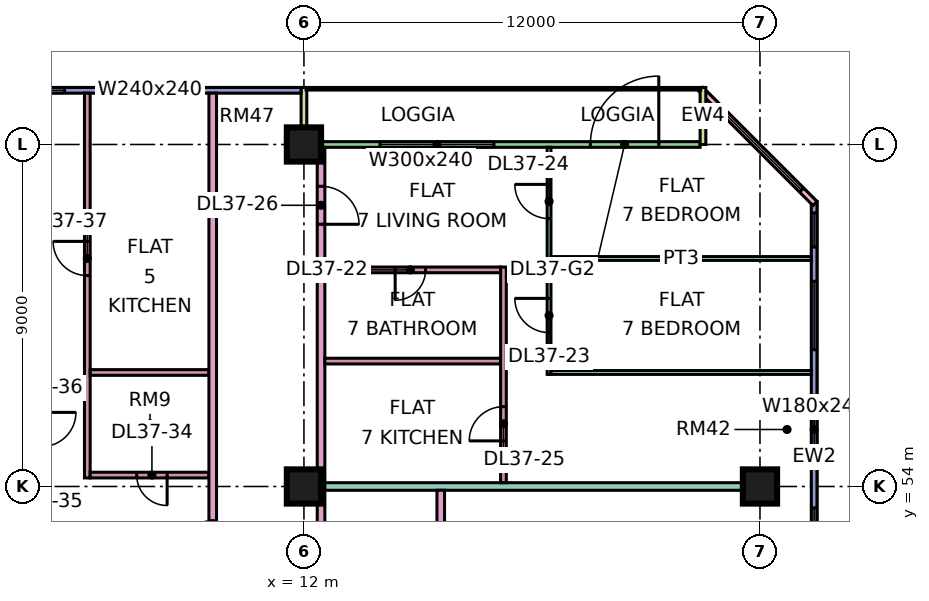
"""IFC4 building model, lengths in metres.
Left out: names, types, materials, properties, quantities, classifications, styles, units other than length and angle.
Written with IfcOpenShell. Run it as: python <this file> out.ifc"""

import sys

from ifc_helpers import new_model, si_unit, direction, frame, frame_2d, origin, origin_2d, place, context, subcontext, project, spatial, rectangle, extrude, element, fill, save


model = new_model("IFC4")
c1 = context("Model", 3, precision=1e-05, world=origin(), true_north=direction((0.0, 1.0)))
c2 = subcontext(c1, "Body", "Model", "MODEL_VIEW")
j1 = project(units=[si_unit("LENGTHUNIT", "METRE"), si_unit("PLANEANGLEUNIT", "RADIAN")], contexts=[c1])
p1 = place(None, origin())
s1 = spatial("IfcSite", under=j1, at=p1, CompositionType="ELEMENT")
p2 = place(p1, origin())
s2 = spatial("IfcBuilding", under=s1, at=p2, CompositionType="ELEMENT")
p3 = place(p2, frame((0.0, 0.0, 164.9)))
s3 = spatial("IfcBuildingStorey", under=s2, at=p3, CompositionType="ELEMENT", Elevation=164.9)
for number, where, z_axis, x_axis in (
    (1, (12.0, 54.0, 0.0), (0.0, 0.0, 1.0), (1.0, 0.0, 0.0)),
    (2, (12.0, 63.0, 0.0), (0.0, 0.0, 1.0), (1.0, 0.0, 0.0)),
    (3, (24.0, 54.0, 0.0), (0.0, 0.0, 1.0), (1.0, 0.0, 0.0)),
):
    element("IfcColumn", number, at=place(p3, frame(where, z_axis=z_axis, x_axis=x_axis)), inside=s3, PredefinedType="COLUMN", context=c2, shape_type="SweptSolid", body=[
        extrude(rectangle(XDim=0.9, YDim=0.9, at=origin_2d()), origin(), (0.0, 0.0, 1.0), 3.75),
    ])
p4 = place(p3, frame((25.425, 48.075, 0.0), z_axis=(0.0, 0.0, 1.0), x_axis=(0.0, 1.0, 0.0)))
e4 = element("IfcWall", 4, at=p4, inside=s3, PredefinedType="SOLIDWALL", context=c2, shape_type="SweptSolid", body=[
    extrude(rectangle(XDim=13.425, YDim=0.15, at=frame_2d((6.712, 0.0))), origin(), (0.0, 0.0, 1.0), 3.35),
])
p5 = place(p4, frame((0.562, 0.0, 0.45)))
e5 = element("IfcOpeningElement", 5, at=p5, cuts=e4, PredefinedType="OPENING", context=c2, shape_type="SweptSolid", body=[
    extrude(rectangle(XDim=4.8, YDim=2.4, at=frame_2d((2.4, 1.2))), frame((0.0, 0.085, 0.0), z_axis=(0.0, -1.0, 0.0), x_axis=(1.0, 0.0, 0.0)), (0.0, 0.0, 1.0), 0.17),
])
p6 = place(p4, frame((6.525, 0.0, 0.45)))
e6 = element("IfcOpeningElement", 6, at=p6, cuts=e4, PredefinedType="OPENING", context=c2, shape_type="SweptSolid", body=[
    extrude(rectangle(XDim=1.8, YDim=2.4, at=frame_2d((0.9, 1.2))), frame((0.0, 0.085, 0.0), z_axis=(0.0, -1.0, 0.0), x_axis=(1.0, 0.0, 0.0)), (0.0, 0.0, 1.0), 0.17),
])
p7 = place(p4, frame((9.525, 0.0, 0.45)))
e7 = element("IfcOpeningElement", 7, at=p7, cuts=e4, PredefinedType="OPENING", context=c2, shape_type="SweptSolid", body=[
    extrude(rectangle(XDim=1.8, YDim=2.4, at=frame_2d((0.9, 1.2))), frame((0.0, 0.085, 0.0), z_axis=(0.0, -1.0, 0.0), x_axis=(1.0, 0.0, 0.0)), (0.0, 0.0, 1.0), 0.17),
])
p8 = place(p4, frame((12.225, 0.0, 0.45)))
e8 = element("IfcOpeningElement", 8, at=p8, cuts=e4, PredefinedType="OPENING", context=c2, shape_type="SweptSolid", body=[
    extrude(rectangle(XDim=0.9, YDim=2.4, at=frame_2d((0.45, 1.2))), frame((0.0, 0.085, 0.0), z_axis=(0.0, -1.0, 0.0), x_axis=(1.0, 0.0, 0.0)), (0.0, 0.0, 1.0), 0.17),
])
p9 = place(p3, frame((25.447, 61.447, 0.0), z_axis=(0.0, 0.0, 1.0), x_axis=(-0.707106781187, 0.707106781187, 0.0)))
e9 = element("IfcWall", 9, at=p9, inside=s3, PredefinedType="SOLIDWALL", context=c2, shape_type="SweptSolid", body=[
    extrude(rectangle(XDim=4.243, YDim=0.15, at=frame_2d((2.121, 0.0))), origin(), (0.0, 0.0, 1.0), 3.35),
])
p10 = place(p9, frame((0.498, 0.0, 0.45)))
e10 = element("IfcOpeningElement", 10, at=p10, cuts=e9, PredefinedType="OPENING", context=c2, shape_type="SweptSolid", body=[
    extrude(rectangle(XDim=3.0, YDim=2.4, at=frame_2d((1.5, 1.2))), frame((0.0, 0.085, 0.0), z_axis=(0.0, -1.0, 0.0), x_axis=(1.0, 0.0, 0.0)), (0.0, 0.0, 1.0), 0.17),
])
p11 = place(p3, frame((22.425, 63.0, 0.0), z_axis=(0.0, 0.0, 1.0), x_axis=(-1.0, 0.0, 0.0)))
e11 = element("IfcWall", 11, at=p11, inside=s3, PredefinedType="SOLIDWALL", context=c2, shape_type="SweptSolid", body=[
    extrude(rectangle(XDim=10.35, YDim=0.15, at=frame_2d((5.175, 0.0))), origin(), (0.0, 0.0, 1.0), 3.35),
])
p12 = place(p11, frame((1.087, 0.0, 0.0)))
e12 = element("IfcOpeningElement", 12, at=p12, cuts=e11, PredefinedType="OPENING", context=c2, shape_type="SweptSolid", body=[
    extrude(rectangle(XDim=1.8, YDim=2.4, at=frame_2d((0.9, 1.2))), frame((0.0, 0.085, 0.0), z_axis=(0.0, -1.0, 0.0), x_axis=(1.0, 0.0, 0.0)), (0.0, 0.0, 1.0), 0.17),
])
p13 = place(p11, frame((5.425, 0.0, 0.45)))
e13 = element("IfcOpeningElement", 13, at=p13, cuts=e11, PredefinedType="OPENING", context=c2, shape_type="SweptSolid", body=[
    extrude(rectangle(XDim=3.0, YDim=2.4, at=frame_2d((1.5, 1.2))), frame((0.0, 0.085, 0.0), z_axis=(0.0, -1.0, 0.0), x_axis=(1.0, 0.0, 0.0)), (0.0, 0.0, 1.0), 0.17),
])
for number, where, z_axis, x_axis in (
    (14, (22.5, 64.5, 0.0), (0.0, 0.0, 1.0), (0.0, -1.0, 0.0)),
    (15, (12.0, 64.5, 0.0), (0.0, 0.0, 1.0), (0.0, -1.0, 0.0)),
):
    element("IfcWall", number, at=place(p3, frame(where, z_axis=z_axis, x_axis=x_axis)), inside=s3, PredefinedType="SOLIDWALL", context=c2, shape_type="SweptSolid", body=[
        extrude(rectangle(XDim=1.5, YDim=0.15, at=frame_2d((0.75, 0.0))), origin(), (0.0, 0.0, 1.0), 3.35),
    ])
p14 = place(p3, frame((11.925, 64.425, 0.0), z_axis=(0.0, 0.0, 1.0), x_axis=(-1.0, 0.0, 0.0)))
e16 = element("IfcWall", 16, at=p14, inside=s3, PredefinedType="SOLIDWALL", context=c2, shape_type="SweptSolid", body=[
    extrude(rectangle(XDim=10.425, YDim=0.15, at=frame_2d((5.212, 0.0))), origin(), (0.0, 0.0, 1.0), 3.35),
])
p15 = place(p14, frame((2.775, 0.0, 0.45)))
e17 = element("IfcOpeningElement", 17, at=p15, cuts=e16, PredefinedType="OPENING", context=c2, shape_type="SweptSolid", body=[
    extrude(rectangle(XDim=2.4, YDim=2.4, at=frame_2d((1.2, 1.2))), frame((0.0, 0.085, 0.0), z_axis=(0.0, -1.0, 0.0), x_axis=(1.0, 0.0, 0.0)), (0.0, 0.0, 1.0), 0.17),
])
p16 = place(p14, frame((6.225, 0.0, 0.45)))
e18 = element("IfcOpeningElement", 18, at=p16, cuts=e16, PredefinedType="OPENING", context=c2, shape_type="SweptSolid", body=[
    extrude(rectangle(XDim=3.6, YDim=2.4, at=frame_2d((1.8, 1.2))), frame((0.0, 0.085, 0.0), z_axis=(0.0, -1.0, 0.0), x_axis=(1.0, 0.0, 0.0)), (0.0, 0.0, 1.0), 0.17),
])
p17 = place(p3, frame((6.3, 54.225, 0.0), z_axis=(0.0, 0.0, 1.0), x_axis=(0.0, 1.0, 0.0)))
e19 = element("IfcWall", 19, at=p17, inside=s3, PredefinedType="PARTITIONING", context=c2, shape_type="SweptSolid", body=[
    extrude(rectangle(XDim=10.125, YDim=0.15, at=frame_2d((5.062, 0.0))), origin(), (0.0, 0.0, 1.0), 3.35),
])
p18 = place(p17, frame((5.325, 0.0, 0.0)))
e20 = element("IfcOpeningElement", 20, at=p18, cuts=e19, PredefinedType="OPENING", context=c2, shape_type="SweptSolid", body=[
    extrude(rectangle(XDim=0.9, YDim=2.1, at=frame_2d((0.45, 1.05))), frame((0.0, 0.085, 0.0), z_axis=(0.0, -1.0, 0.0), x_axis=(1.0, 0.0, 0.0)), (0.0, 0.0, 1.0), 0.17),
])
p19 = place(p3, frame((6.375, 54.3, 0.0), z_axis=(0.0, 0.0, 1.0), x_axis=(1.0, 0.0, 0.0)))
e21 = element("IfcWall", 21, at=p19, inside=s3, PredefinedType="PARTITIONING", context=c2, shape_type="SweptSolid", body=[
    extrude(rectangle(XDim=3.125, YDim=0.15, at=frame_2d((1.562, 0.0))), origin(), (0.0, 0.0, 1.0), 3.35),
])
p20 = place(p19, frame((1.225, 0.0, 0.0)))
e22 = element("IfcOpeningElement", 22, at=p20, cuts=e21, PredefinedType="OPENING", context=c2, shape_type="SweptSolid", body=[
    extrude(rectangle(XDim=0.8, YDim=2.1, at=frame_2d((0.4, 1.05))), frame((0.0, 0.085, 0.0), z_axis=(0.0, -1.0, 0.0), x_axis=(1.0, 0.0, 0.0)), (0.0, 0.0, 1.0), 0.17),
])
p21 = place(p3, frame((6.375, 57.0, 0.0), z_axis=(0.0, 0.0, 1.0), x_axis=(1.0, 0.0, 0.0)))
e23 = element("IfcWall", 23, at=p21, inside=s3, PredefinedType="PARTITIONING", context=c2, shape_type="SweptSolid", body=[
    extrude(rectangle(XDim=3.125, YDim=0.15, at=frame_2d((1.562, 0.0))), origin(), (0.0, 0.0, 1.0), 3.35),
])
p22 = place(p3, frame((9.6, 20.0, 0.0), z_axis=(0.0, 0.0, 1.0), x_axis=(0.0, 1.0, 0.0)))
e24 = element("IfcWall", 24, at=p22, inside=s3, PredefinedType="PARTITIONING", context=c2, shape_type="SweptSolid", body=[
    extrude(rectangle(XDim=44.35, YDim=0.2, at=frame_2d((22.175, 0.0))), origin(), (0.0, 0.0, 1.0), 3.35),
])
p23 = place(p22, frame((28.8, 0.0, 0.0)))
e25 = element("IfcOpeningElement", 25, at=p23, cuts=e24, PredefinedType="OPENING", context=c2, shape_type="SweptSolid", body=[
    extrude(rectangle(XDim=1.0, YDim=2.1, at=frame_2d((0.5, 1.05))), frame((0.0, 0.11, 0.0), z_axis=(0.0, -1.0, 0.0), x_axis=(1.0, 0.0, 0.0)), (0.0, 0.0, 1.0), 0.22),
])
p24 = place(p22, frame((32.1, 0.0, 0.0)))
e26 = element("IfcOpeningElement", 26, at=p24, cuts=e24, PredefinedType="OPENING", context=c2, shape_type="SweptSolid", body=[
    extrude(rectangle(XDim=1.0, YDim=2.1, at=frame_2d((0.5, 1.05))), frame((0.0, 0.11, 0.0), z_axis=(0.0, -1.0, 0.0), x_axis=(1.0, 0.0, 0.0)), (0.0, 0.0, 1.0), 0.22),
])
p25 = place(p22, frame((0.6, 0.0, 0.0)))
e27 = element("IfcOpeningElement", 27, at=p25, cuts=e24, PredefinedType="OPENING", context=c2, shape_type="SweptSolid", body=[
    extrude(rectangle(XDim=1.2, YDim=2.1, at=frame_2d((0.6, 1.05))), frame((0.0, 0.11, 0.0), z_axis=(0.0, -1.0, 0.0), x_axis=(1.0, 0.0, 0.0)), (0.0, 0.0, 1.0), 0.22),
])
p26 = place(p22, frame((14.25, 0.0, 0.0)))
e28 = element("IfcOpeningElement", 28, at=p26, cuts=e24, PredefinedType="OPENING", context=c2, shape_type="SweptSolid", body=[
    extrude(rectangle(XDim=1.0, YDim=2.1, at=frame_2d((0.5, 1.05))), frame((0.0, 0.11, 0.0), z_axis=(0.0, -1.0, 0.0), x_axis=(1.0, 0.0, 0.0)), (0.0, 0.0, 1.0), 0.22),
])
p27 = place(p3, frame((12.45, 20.0, 0.0), z_axis=(0.0, 0.0, 1.0), x_axis=(0.0, 1.0, 0.0)))
e29 = element("IfcWall", 29, at=p27, inside=s3, PredefinedType="PARTITIONING", context=c2, shape_type="SweptSolid", body=[
    extrude(rectangle(XDim=42.926, YDim=0.2, at=frame_2d((21.463, 0.0))), origin(), (0.0, 0.0, 1.0), 3.35),
])
p28 = place(p27, frame((6.55, 0.0, 0.0)))
e30 = element("IfcOpeningElement", 30, at=p28, cuts=e29, PredefinedType="OPENING", context=c2, shape_type="SweptSolid", body=[
    extrude(rectangle(XDim=1.0, YDim=2.1, at=frame_2d((0.5, 1.05))), frame((0.0, 0.11, 0.0), z_axis=(0.0, -1.0, 0.0), x_axis=(1.0, 0.0, 0.0)), (0.0, 0.0, 1.0), 0.22),
])
p29 = place(p27, frame((12.25, 0.0, 0.0)))
e31 = element("IfcOpeningElement", 31, at=p29, cuts=e29, PredefinedType="OPENING", context=c2, shape_type="SweptSolid", body=[
    extrude(rectangle(XDim=1.6, YDim=2.1, at=frame_2d((0.8, 1.05))), frame((0.0, 0.11, 0.0), z_axis=(0.0, -1.0, 0.0), x_axis=(1.0, 0.0, 0.0)), (0.0, 0.0, 1.0), 0.22),
])
p30 = place(p27, frame((16.9, 0.0, 0.0)))
e32 = element("IfcOpeningElement", 32, at=p30, cuts=e29, PredefinedType="OPENING", context=c2, shape_type="SweptSolid", body=[
    extrude(rectangle(XDim=1.0, YDim=2.1, at=frame_2d((0.5, 1.05))), frame((0.0, 0.11, 0.0), z_axis=(0.0, -1.0, 0.0), x_axis=(1.0, 0.0, 0.0)), (0.0, 0.0, 1.0), 0.22),
])
p31 = place(p27, frame((40.9, 0.0, 0.0)))
e33 = element("IfcOpeningElement", 33, at=p31, cuts=e29, PredefinedType="OPENING", context=c2, shape_type="SweptSolid", body=[
    extrude(rectangle(XDim=1.0, YDim=2.1, at=frame_2d((0.5, 1.05))), frame((0.0, 0.11, 0.0), z_axis=(0.0, -1.0, 0.0), x_axis=(1.0, 0.0, 0.0)), (0.0, 0.0, 1.0), 0.22),
])
p32 = place(p27, frame((1.15, 0.0, 0.0)))
e34 = element("IfcOpeningElement", 34, at=p32, cuts=e29, PredefinedType="OPENING", context=c2, shape_type="SweptSolid", body=[
    extrude(rectangle(XDim=1.8, YDim=2.1, at=frame_2d((0.9, 1.05))), frame((0.0, 0.11, 0.0), z_axis=(0.0, -1.0, 0.0), x_axis=(1.0, 0.0, 0.0)), (0.0, 0.0, 1.0), 0.22),
])
p33 = place(p27, frame((28.6, 0.0, 0.0)))
e35 = element("IfcOpeningElement", 35, at=p33, cuts=e29, PredefinedType="OPENING", context=c2, shape_type="SweptSolid", body=[
    extrude(rectangle(XDim=1.8, YDim=2.1, at=frame_2d((0.9, 1.05))), frame((0.0, 0.11, 0.0), z_axis=(0.0, -1.0, 0.0), x_axis=(1.0, 0.0, 0.0)), (0.0, 0.0, 1.0), 0.22),
])
p34 = place(p3, frame((12.55, 54.0, 0.0), z_axis=(0.0, 0.0, 1.0), x_axis=(1.0, 0.0, 0.0)))
e36 = element("IfcWall", 36, at=p34, inside=s3, PredefinedType="PARTITIONING", context=c2, shape_type="SweptSolid", body=[
    extrude(rectangle(XDim=11.45, YDim=0.2, at=frame_2d((5.725, 0.0))), origin(), (0.0, 0.0, 1.0), 3.35),
])
p35 = place(p3, frame((12.55, 57.3, 0.0), z_axis=(0.0, 0.0, 1.0), x_axis=(1.0, 0.0, 0.0)))
e37 = element("IfcWall", 37, at=p35, inside=s3, PredefinedType="PARTITIONING", context=c2, shape_type="SweptSolid", body=[
    extrude(rectangle(XDim=4.625, YDim=0.15, at=frame_2d((2.312, 0.0))), origin(), (0.0, 0.0, 1.0), 3.35),
])
p36 = place(p3, frame((12.55, 59.7, 0.0), z_axis=(0.0, 0.0, 1.0), x_axis=(1.0, 0.0, 0.0)))
e38 = element("IfcWall", 38, at=p36, inside=s3, PredefinedType="PARTITIONING", context=c2, shape_type="SweptSolid", body=[
    extrude(rectangle(XDim=4.625, YDim=0.15, at=frame_2d((2.312, 0.0))), origin(), (0.0, 0.0, 1.0), 3.35),
])
p37 = place(p36, frame((1.85, 0.0, 0.0)))
e39 = element("IfcOpeningElement", 39, at=p37, cuts=e38, PredefinedType="OPENING", context=c2, shape_type="SweptSolid", body=[
    extrude(rectangle(XDim=0.8, YDim=2.1, at=frame_2d((0.4, 1.05))), frame((0.0, 0.085, 0.0), z_axis=(0.0, -1.0, 0.0), x_axis=(1.0, 0.0, 0.0)), (0.0, 0.0, 1.0), 0.17),
])
p38 = place(p3, frame((15.6, 51.225, 0.0), z_axis=(0.0, 0.0, 1.0), x_axis=(0.0, 1.0, 0.0)))
e40 = element("IfcWall", 40, at=p38, inside=s3, PredefinedType="PARTITIONING", context=c2, shape_type="SweptSolid", body=[
    extrude(rectangle(XDim=2.675, YDim=0.2, at=frame_2d((1.337, 0.0))), origin(), (0.0, 0.0, 1.0), 3.35),
])
p39 = place(p3, frame((17.25, 54.1, 0.0), z_axis=(0.0, 0.0, 1.0), x_axis=(0.0, 1.0, 0.0)))
e41 = element("IfcWall", 41, at=p39, inside=s3, PredefinedType="PARTITIONING", context=c2, shape_type="SweptSolid", body=[
    extrude(rectangle(XDim=5.675, YDim=0.15, at=frame_2d((2.837, 0.0))), origin(), (0.0, 0.0, 1.0), 3.35),
])
p40 = place(p39, frame((1.1, 0.0, 0.0)))
e42 = element("IfcOpeningElement", 42, at=p40, cuts=e41, PredefinedType="OPENING", context=c2, shape_type="SweptSolid", body=[
    extrude(rectangle(XDim=0.9, YDim=2.1, at=frame_2d((0.45, 1.05))), frame((0.0, 0.085, 0.0), z_axis=(0.0, -1.0, 0.0), x_axis=(1.0, 0.0, 0.0)), (0.0, 0.0, 1.0), 0.17),
])
p41 = place(p3, frame((18.45, 56.95, 0.0), z_axis=(0.0, 0.0, 1.0), x_axis=(0.0, 1.0, 0.0)))
e43 = element("IfcWall", 43, at=p41, inside=s3, PredefinedType="PARTITIONING", context=c2, shape_type="SweptSolid", body=[
    extrude(rectangle(XDim=5.976, YDim=0.1, at=frame_2d((2.988, 0.0))), origin(), (0.0, 0.0, 1.0), 3.35),
])
p42 = place(p41, frame((1.1, 0.0, 0.0)))
e44 = element("IfcOpeningElement", 44, at=p42, cuts=e43, PredefinedType="OPENING", context=c2, shape_type="SweptSolid", body=[
    extrude(rectangle(XDim=0.9, YDim=2.1, at=frame_2d((0.45, 1.05))), frame((0.0, 0.06, 0.0), z_axis=(0.0, -1.0, 0.0), x_axis=(1.0, 0.0, 0.0)), (0.0, 0.0, 1.0), 0.12),
])
p43 = place(p41, frame((4.1, 0.0, 0.0)))
e45 = element("IfcOpeningElement", 45, at=p43, cuts=e43, PredefinedType="OPENING", context=c2, shape_type="SweptSolid", body=[
    extrude(rectangle(XDim=0.9, YDim=2.1, at=frame_2d((0.45, 1.05))), frame((0.0, 0.06, 0.0), z_axis=(0.0, -1.0, 0.0), x_axis=(1.0, 0.0, 0.0)), (0.0, 0.0, 1.0), 0.12),
])
p44 = place(p3, frame((18.5, 57.0, 0.0), z_axis=(0.0, 0.0, 1.0), x_axis=(1.0, 0.0, 0.0)))
e46 = element("IfcWall", 46, at=p44, inside=s3, PredefinedType="PARTITIONING", context=c2, shape_type="SweptSolid", body=[
    extrude(rectangle(XDim=6.85, YDim=0.1, at=frame_2d((3.425, 0.0))), origin(), (0.0, 0.0, 1.0), 3.35),
])
p45 = place(p3, frame((18.5, 60.0, 0.0), z_axis=(0.0, 0.0, 1.0), x_axis=(1.0, 0.0, 0.0)))
e47 = element("IfcWall", 47, at=p45, inside=s3, PredefinedType="PARTITIONING", context=c2, shape_type="SweptSolid", body=[
    extrude(rectangle(XDim=6.851, YDim=0.1, at=frame_2d((3.426, 0.0))), origin(), (0.0, 0.0, 1.0), 3.35),
])
p46 = place(p5, origin())
e48 = element("IfcWindow", 48, at=p46, inside=s3, PartitioningType="SINGLE_PANEL", PredefinedType="WINDOW", context=c2, shape_type="SweptSolid", body=[
    extrude(rectangle(XDim=4.8, YDim=2.4, at=frame_2d((2.4, 1.2))), frame((0.0, 0.03, 0.0), z_axis=(0.0, -1.0, 0.0), x_axis=(1.0, 0.0, 0.0)), (0.0, 0.0, 1.0), 0.06),
])
fill(e5, e48)
p47 = place(p6, origin())
e49 = element("IfcWindow", 49, at=p47, inside=s3, PartitioningType="SINGLE_PANEL", PredefinedType="WINDOW", context=c2, shape_type="SweptSolid", body=[
    extrude(rectangle(XDim=1.8, YDim=2.4, at=frame_2d((0.9, 1.2))), frame((0.0, 0.03, 0.0), z_axis=(0.0, -1.0, 0.0), x_axis=(1.0, 0.0, 0.0)), (0.0, 0.0, 1.0), 0.06),
])
fill(e6, e49)
p48 = place(p7, origin())
e50 = element("IfcWindow", 50, at=p48, inside=s3, PartitioningType="SINGLE_PANEL", PredefinedType="WINDOW", context=c2, shape_type="SweptSolid", body=[
    extrude(rectangle(XDim=1.8, YDim=2.4, at=frame_2d((0.9, 1.2))), frame((0.0, 0.03, 0.0), z_axis=(0.0, -1.0, 0.0), x_axis=(1.0, 0.0, 0.0)), (0.0, 0.0, 1.0), 0.06),
])
fill(e7, e50)
p49 = place(p8, origin())
e51 = element("IfcWindow", 51, at=p49, inside=s3, PartitioningType="SINGLE_PANEL", PredefinedType="WINDOW", context=c2, shape_type="SweptSolid", body=[
    extrude(rectangle(XDim=0.9, YDim=2.4, at=frame_2d((0.45, 1.2))), frame((0.0, 0.03, 0.0), z_axis=(0.0, -1.0, 0.0), x_axis=(1.0, 0.0, 0.0)), (0.0, 0.0, 1.0), 0.06),
])
fill(e8, e51)
p50 = place(p10, origin())
e52 = element("IfcWindow", 52, at=p50, inside=s3, PartitioningType="SINGLE_PANEL", PredefinedType="WINDOW", context=c2, shape_type="SweptSolid", body=[
    extrude(rectangle(XDim=3.0, YDim=2.4, at=frame_2d((1.5, 1.2))), frame((0.0, 0.03, 0.0), z_axis=(0.0, -1.0, 0.0), x_axis=(1.0, 0.0, 0.0)), (0.0, 0.0, 1.0), 0.06),
])
fill(e10, e52)
p51 = place(p12, frame((1.8, 0.0, 0.0), z_axis=(0.0, 0.0, 1.0), x_axis=(-1.0, 0.0, 0.0)))
e53 = element("IfcDoor", 53, at=p51, inside=s3, OperationType="DOUBLE_DOOR_SINGLE_SWING", PredefinedType="DOOR", context=c2, shape_type="SweptSolid", body=[
    extrude(rectangle(XDim=1.8, YDim=2.4, at=frame_2d((0.9, 1.2))), frame((0.0, 0.025, 0.0), z_axis=(0.0, -1.0, 0.0), x_axis=(1.0, 0.0, 0.0)), (0.0, 0.0, 1.0), 0.05),
])
fill(e12, e53)
p52 = place(p13, origin())
e54 = element("IfcWindow", 54, at=p52, inside=s3, PartitioningType="SINGLE_PANEL", PredefinedType="WINDOW", context=c2, shape_type="SweptSolid", body=[
    extrude(rectangle(XDim=3.0, YDim=2.4, at=frame_2d((1.5, 1.2))), frame((0.0, 0.03, 0.0), z_axis=(0.0, -1.0, 0.0), x_axis=(1.0, 0.0, 0.0)), (0.0, 0.0, 1.0), 0.06),
])
fill(e13, e54)
p53 = place(p15, origin())
e55 = element("IfcWindow", 55, at=p53, inside=s3, PartitioningType="SINGLE_PANEL", PredefinedType="WINDOW", context=c2, shape_type="SweptSolid", body=[
    extrude(rectangle(XDim=2.4, YDim=2.4, at=frame_2d((1.2, 1.2))), frame((0.0, 0.03, 0.0), z_axis=(0.0, -1.0, 0.0), x_axis=(1.0, 0.0, 0.0)), (0.0, 0.0, 1.0), 0.06),
])
fill(e17, e55)
p54 = place(p16, origin())
e56 = element("IfcWindow", 56, at=p54, inside=s3, PartitioningType="SINGLE_PANEL", PredefinedType="WINDOW", context=c2, shape_type="SweptSolid", body=[
    extrude(rectangle(XDim=3.6, YDim=2.4, at=frame_2d((1.8, 1.2))), frame((0.0, 0.03, 0.0), z_axis=(0.0, -1.0, 0.0), x_axis=(1.0, 0.0, 0.0)), (0.0, 0.0, 1.0), 0.06),
])
fill(e18, e56)
p55 = place(p37, frame((0.8, 0.0, 0.0), z_axis=(0.0, 0.0, 1.0), x_axis=(-1.0, 0.0, 0.0)))
e57 = element("IfcDoor", 57, at=p55, inside=s3, OperationType="SINGLE_SWING_LEFT", PredefinedType="DOOR", context=c2, shape_type="SweptSolid", body=[
    extrude(rectangle(XDim=0.8, YDim=2.1, at=frame_2d((0.4, 1.05))), frame((0.0, 0.025, 0.0), z_axis=(0.0, -1.0, 0.0), x_axis=(1.0, 0.0, 0.0)), (0.0, 0.0, 1.0), 0.05),
])
fill(e39, e57)
p56 = place(p42, frame((0.9, 0.0, 0.0), z_axis=(0.0, 0.0, 1.0), x_axis=(-1.0, 0.0, 0.0)))
e58 = element("IfcDoor", 58, at=p56, inside=s3, OperationType="SINGLE_SWING_RIGHT", PredefinedType="DOOR", context=c2, shape_type="SweptSolid", body=[
    extrude(rectangle(XDim=0.9, YDim=2.1, at=frame_2d((0.45, 1.05))), frame((0.0, 0.025, 0.0), z_axis=(0.0, -1.0, 0.0), x_axis=(1.0, 0.0, 0.0)), (0.0, 0.0, 1.0), 0.05),
])
fill(e44, e58)
p57 = place(p43, frame((0.9, 0.0, 0.0), z_axis=(0.0, 0.0, 1.0), x_axis=(-1.0, 0.0, 0.0)))
e59 = element("IfcDoor", 59, at=p57, inside=s3, OperationType="SINGLE_SWING_RIGHT", PredefinedType="DOOR", context=c2, shape_type="SweptSolid", body=[
    extrude(rectangle(XDim=0.9, YDim=2.1, at=frame_2d((0.45, 1.05))), frame((0.0, 0.025, 0.0), z_axis=(0.0, -1.0, 0.0), x_axis=(1.0, 0.0, 0.0)), (0.0, 0.0, 1.0), 0.05),
])
fill(e45, e59)
p58 = place(p40, origin())
e60 = element("IfcDoor", 60, at=p58, inside=s3, OperationType="SINGLE_SWING_LEFT", PredefinedType="DOOR", context=c2, shape_type="SweptSolid", body=[
    extrude(rectangle(XDim=0.9, YDim=2.1, at=frame_2d((0.45, 1.05))), frame((0.0, 0.025, 0.0), z_axis=(0.0, -1.0, 0.0), x_axis=(1.0, 0.0, 0.0)), (0.0, 0.0, 1.0), 0.05),
])
fill(e42, e60)
p59 = place(p31, frame((1.0, 0.0, 0.0), z_axis=(0.0, 0.0, 1.0), x_axis=(-1.0, 0.0, 0.0)))
e61 = element("IfcDoor", 61, at=p59, inside=s3, OperationType="SINGLE_SWING_LEFT", PredefinedType="DOOR", context=c2, shape_type="SweptSolid", body=[
    extrude(rectangle(XDim=1.0, YDim=2.1, at=frame_2d((0.5, 1.05))), frame((0.0, 0.025, 0.0), z_axis=(0.0, -1.0, 0.0), x_axis=(1.0, 0.0, 0.0)), (0.0, 0.0, 1.0), 0.05),
])
fill(e33, e61)
p60 = place(p20, origin())
e62 = element("IfcDoor", 62, at=p60, inside=s3, OperationType="SINGLE_SWING_RIGHT", PredefinedType="DOOR", context=c2, shape_type="SweptSolid", body=[
    extrude(rectangle(XDim=0.8, YDim=2.1, at=frame_2d((0.4, 1.05))), frame((0.0, 0.025, 0.0), z_axis=(0.0, -1.0, 0.0), x_axis=(1.0, 0.0, 0.0)), (0.0, 0.0, 1.0), 0.05),
])
fill(e22, e62)
p61 = place(p18, frame((0.9, 0.0, 0.0), z_axis=(0.0, 0.0, 1.0), x_axis=(-1.0, 0.0, 0.0)))
e63 = element("IfcDoor", 63, at=p61, inside=s3, OperationType="SINGLE_SWING_RIGHT", PredefinedType="DOOR", context=c2, shape_type="SweptSolid", body=[
    extrude(rectangle(XDim=0.9, YDim=2.1, at=frame_2d((0.45, 1.05))), frame((0.0, 0.025, 0.0), z_axis=(0.0, -1.0, 0.0), x_axis=(1.0, 0.0, 0.0)), (0.0, 0.0, 1.0), 0.05),
])
fill(e20, e63)
p62 = place(p24, origin())
e64 = element("IfcDoor", 64, at=p62, inside=s3, OperationType="SINGLE_SWING_LEFT", PredefinedType="DOOR", context=c2, shape_type="SweptSolid", body=[
    extrude(rectangle(XDim=1.0, YDim=2.1, at=frame_2d((0.5, 1.05))), frame((0.0, 0.025, 0.0), z_axis=(0.0, -1.0, 0.0), x_axis=(1.0, 0.0, 0.0)), (0.0, 0.0, 1.0), 0.05),
])
fill(e26, e64)
save(model, sys.argv[1])
